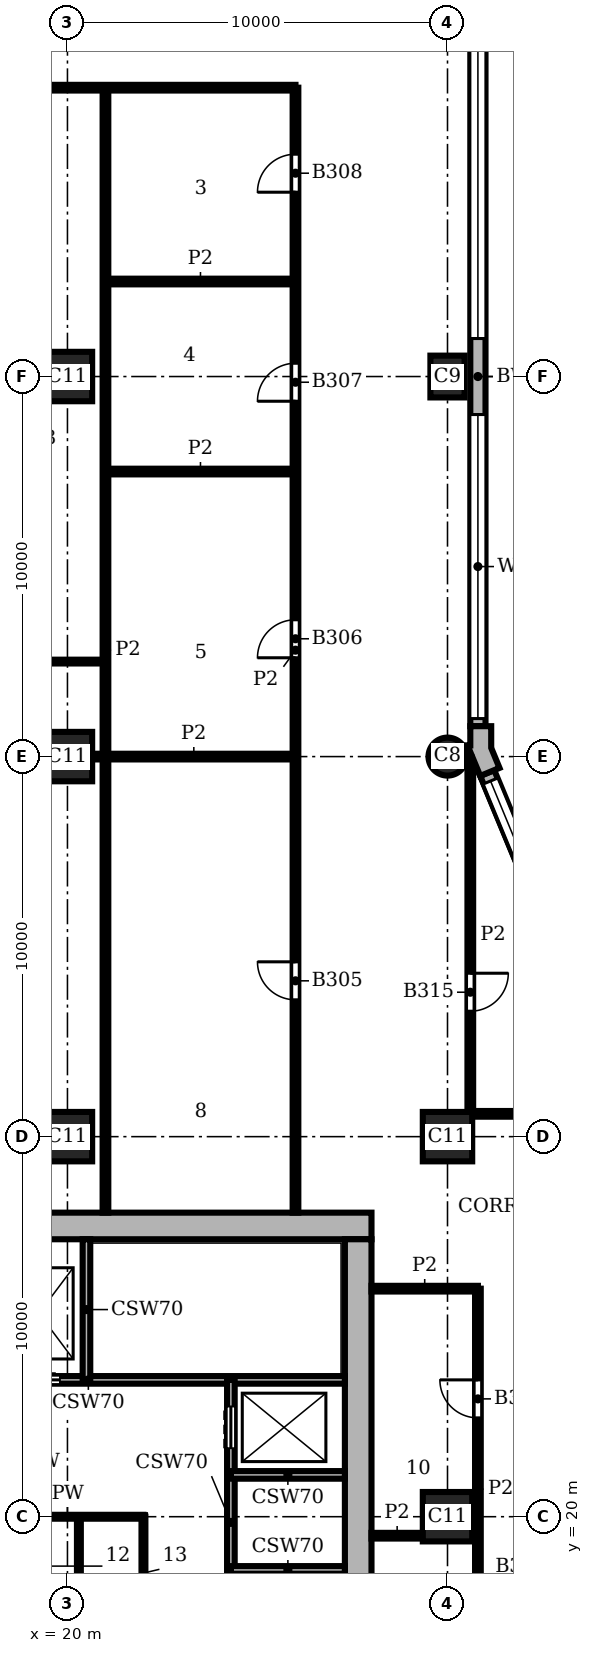
"""IFC4 building model, lengths in metres.
Left out: names, types, materials, properties, quantities, classifications, styles, units other than length and angle.
Written with IfcOpenShell. Run it as: python <this file> out.ifc"""

import sys

from ifc_helpers import new_model, si_unit, direction, frame, frame_2d, origin, origin_2d, place, context, subcontext, project, spatial, polyline, rectangle, circle, outline, extrude, element, fill, save


model = new_model("IFC4")
c1 = context("Model", 3, precision=1e-05, world=origin(), true_north=direction((0.0, 1.0)))
c2 = subcontext(c1, "Body", "Model", "MODEL_VIEW")
j1 = project(units=[si_unit("LENGTHUNIT", "METRE"), si_unit("PLANEANGLEUNIT", "RADIAN")], contexts=[c1])
p1 = place(None, origin())
s1 = spatial("IfcSite", under=j1, at=p1, CompositionType="ELEMENT")
p2 = place(p1, origin())
s2 = spatial("IfcBuilding", under=s1, at=p2, CompositionType="ELEMENT")
p3 = place(p2, frame((0.0, 0.0, 155.1)))
s3 = spatial("IfcBuildingStorey", under=s2, at=p3, CompositionType="ELEMENT", Elevation=155.1)
p4 = place(p3, frame((30.0, 40.0, 0.0), z_axis=(0.0, 0.0, 1.0), x_axis=(1.0, 0.0, 0.0)))
e1 = element("IfcColumn", 1, at=p4, inside=s3, PredefinedType="COLUMN", context=c2, shape_type="SweptSolid", body=[
    extrude(circle(Radius=0.5, at=origin_2d()), origin(), (0.0, 0.0, 1.0), 3.9),
])
p5 = place(p3, frame((30.0, 50.0, 0.0), z_axis=(0.0, 0.0, 1.0), x_axis=(0.0, 1.0, 0.0)))
e2 = element("IfcColumn", 2, at=p5, inside=s3, PredefinedType="COLUMN", context=c2, shape_type="SweptSolid", body=[
    extrude(rectangle(XDim=1.1, YDim=0.9, at=origin_2d()), origin(), (0.0, 0.0, 1.0), 3.9),
])
for number, where, z_axis, x_axis in (
    (3, (20.0, 30.0, 0.0), (0.0, 0.0, 1.0), (1.0, 0.0, 0.0)),
    (4, (20.0, 40.0, 0.0), (0.0, 0.0, 1.0), (1.0, 0.0, 0.0)),
    (5, (20.0, 50.0, 0.0), (0.0, 0.0, 1.0), (1.0, 0.0, 0.0)),
    (6, (30.0, 20.0, 0.0), (0.0, 0.0, 1.0), (1.0, 0.0, 0.0)),
    (7, (30.0, 30.0, 0.0), (0.0, 0.0, 1.0), (1.0, 0.0, 0.0)),
):
    element("IfcColumn", number, at=place(p3, frame(where, z_axis=z_axis, x_axis=x_axis)), inside=s3, PredefinedType="COLUMN", context=c2, shape_type="SweptSolid", body=[
        extrude(rectangle(XDim=1.3, YDim=1.3, at=origin_2d()), origin(), (0.0, 0.0, 1.0), 3.9),
    ])
p6 = place(p3, frame((27.65, 8.7, 0.0), z_axis=(0.0, 0.0, 1.0), x_axis=(0.0, 1.0, 0.0)))
e8 = element("IfcWall", 8, at=p6, inside=s3, PredefinedType="SHEAR", context=c2, shape_type="SweptSolid", body=[
    extrude(rectangle(XDim=18.6, YDim=0.7, at=frame_2d((9.3, 0.0))), origin(), (0.0, 0.0, 1.0), 3.9),
])
p7 = place(p6, frame((4.75, 0.0, 0.0)))
e9 = element("IfcOpeningElement", 9, at=p7, cuts=e8, PredefinedType="OPENING", context=c2, shape_type="SweptSolid", body=[
    extrude(rectangle(XDim=1.6, YDim=2.1, at=frame_2d((0.8, 1.05))), frame((0.0, 0.36, 0.0), z_axis=(0.0, -1.0, 0.0), x_axis=(1.0, 0.0, 0.0)), (0.0, 0.0, 1.0), 0.72),
])
p8 = place(p3, frame((28.0, 27.65, 0.0), z_axis=(0.0, 0.0, 1.0), x_axis=(-1.0, 0.0, 0.0)))
e10 = element("IfcWall", 10, at=p8, inside=s3, PredefinedType="SHEAR", context=c2, shape_type="SweptSolid", body=[
    extrude(rectangle(XDim=20.0, YDim=0.7, at=frame_2d((10.0, 0.0))), origin(), (0.0, 0.0, 1.0), 3.9),
])
p9 = place(p3, origin())
e11 = element("IfcWall", 11, at=p9, inside=s3, PredefinedType="SOLIDWALL", context=c2, shape_type="SweptSolid", body=[
    extrude(outline(polyline([(30.62, 39.995), (30.62, 40.071), (30.861, 39.49), (31.23, 39.644), (31.369, 39.701), (31.15, 40.229), (31.15, 40.8), (31.0, 40.8), (30.6, 40.8), (30.6, 40.295), (30.5, 40.295), (30.5, 39.995), (30.62, 39.995)])), origin(), (0.0, 0.0, 1.0), 3.9),
])
p10 = place(p3, frame((33.362, 33.974, 0.0), z_axis=(0.0, 0.0, 1.0), x_axis=(-0.382655745237, 0.923891000409, 0.0)))
e12 = element("IfcWall", 12, at=p10, inside=s3, PredefinedType="SOLIDWALL", context=c2, shape_type="SweptSolid", body=[
    extrude(rectangle(XDim=6.053, YDim=0.4, at=frame_2d((3.027, 0.0))), origin(), (0.0, 0.0, 1.0), 3.9),
])
p11 = place(p10, frame((0.227, 0.0, 0.9)))
e13 = element("IfcOpeningElement", 13, at=p11, cuts=e12, PredefinedType="OPENING", context=c2, shape_type="SweptSolid", body=[
    extrude(rectangle(XDim=5.6, YDim=2.35, at=frame_2d((2.8, 1.175))), frame((0.0, 0.21, 0.0), z_axis=(0.0, -1.0, 0.0), x_axis=(1.0, 0.0, 0.0)), (0.0, 0.0, 1.0), 0.42),
])
p12 = place(p3, frame((30.8, 40.8, 0.0), z_axis=(0.0, 0.0, 1.0), x_axis=(0.0, 1.0, 0.0)))
e14 = element("IfcWall", 14, at=p12, inside=s3, PredefinedType="SOLIDWALL", context=c2, shape_type="SweptSolid", body=[
    extrude(rectangle(XDim=18.4, YDim=0.4, at=frame_2d((9.2, 0.0))), origin(), (0.0, 0.0, 1.0), 3.9),
])
p13 = place(p12, frame((0.2, 0.0, 0.9)))
e15 = element("IfcOpeningElement", 15, at=p13, cuts=e14, PredefinedType="OPENING", context=c2, shape_type="SweptSolid", body=[
    extrude(rectangle(XDim=8.0, YDim=2.35, at=frame_2d((4.0, 1.175))), frame((0.0, 0.21, 0.0), z_axis=(0.0, -1.0, 0.0), x_axis=(1.0, 0.0, 0.0)), (0.0, 0.0, 1.0), 0.42),
])
p14 = place(p12, frame((10.2, 0.0, 0.9)))
e16 = element("IfcOpeningElement", 16, at=p14, cuts=e14, PredefinedType="OPENING", context=c2, shape_type="SweptSolid", body=[
    extrude(rectangle(XDim=8.0, YDim=2.35, at=frame_2d((4.0, 1.175))), frame((0.0, 0.21, 0.0), z_axis=(0.0, -1.0, 0.0), x_axis=(1.0, 0.0, 0.0)), (0.0, 0.0, 1.0), 0.42),
])
p15 = place(p3, frame((24.3, 18.6, 0.0), z_axis=(0.0, 0.0, 1.0), x_axis=(1.0, 0.0, 0.0)))
e17 = element("IfcWall", 17, at=p15, inside=s3, PredefinedType="SHEAR", context=c2, shape_type="SweptSolid", body=[
    extrude(rectangle(XDim=3.0, YDim=0.2, at=frame_2d((1.5, 0.0))), origin(), (0.0, 0.0, 1.0), 3.58),
])
p16 = place(p3, frame((18.0, 20.0, 0.0), z_axis=(0.0, 0.0, 1.0), x_axis=(1.0, 0.0, 0.0)))
e18 = element("IfcWall", 18, at=p16, inside=s3, PredefinedType="PARTITIONING", context=c2, shape_type="SweptSolid", body=[
    extrude(rectangle(XDim=4.0, YDim=0.1, at=frame_2d((2.0, 0.0))), origin(), (0.0, 0.0, 1.0), 3.58),
])
p17 = place(p3, frame((24.3, 21.1, 0.0), z_axis=(0.0, 0.0, 1.0), x_axis=(1.0, 0.0, 0.0)))
e19 = element("IfcWall", 19, at=p17, inside=s3, PredefinedType="SHEAR", context=c2, shape_type="SweptSolid", body=[
    extrude(rectangle(XDim=3.0, YDim=0.2, at=frame_2d((1.5, 0.0))), origin(), (0.0, 0.0, 1.0), 3.58),
])
p18 = place(p3, frame((13.8, 23.6, 0.0), z_axis=(0.0, 0.0, 1.0), x_axis=(1.0, 0.0, 0.0)))
e20 = element("IfcWall", 20, at=p18, inside=s3, PredefinedType="SHEAR", context=c2, shape_type="SweptSolid", body=[
    extrude(rectangle(XDim=13.5, YDim=0.2, at=frame_2d((6.75, 0.0))), origin(), (0.0, 0.0, 1.0), 3.58),
])
p19 = place(p18, frame((2.4, 0.0, 0.0)))
e21 = element("IfcOpeningElement", 21, at=p19, cuts=e20, PredefinedType="OPENING", context=c2, shape_type="SweptSolid", body=[
    extrude(rectangle(XDim=1.1, YDim=2.1, at=frame_2d((0.55, 1.05))), frame((0.0, 0.11, 0.0), z_axis=(0.0, -1.0, 0.0), x_axis=(1.0, 0.0, 0.0)), (0.0, 0.0, 1.0), 0.22),
])
p20 = place(p18, frame((4.9, 0.0, 0.0)))
e22 = element("IfcOpeningElement", 22, at=p20, cuts=e20, PredefinedType="OPENING", context=c2, shape_type="SweptSolid", body=[
    extrude(rectangle(XDim=1.1, YDim=2.1, at=frame_2d((0.55, 1.05))), frame((0.0, 0.11, 0.0), z_axis=(0.0, -1.0, 0.0), x_axis=(1.0, 0.0, 0.0)), (0.0, 0.0, 1.0), 0.22),
])
p21 = place(p18, frame((0.2, 0.0, 0.0)))
e23 = element("IfcOpeningElement", 23, at=p21, cuts=e20, PredefinedType="OPENING", context=c2, shape_type="SweptSolid", body=[
    extrude(rectangle(XDim=1.0, YDim=2.1, at=frame_2d((0.5, 1.05))), frame((0.0, 0.11, 0.0), z_axis=(0.0, -1.0, 0.0), x_axis=(1.0, 0.0, 0.0)), (0.0, 0.0, 1.0), 0.22),
])
p22 = place(p3, frame((20.3, 17.5, 0.0), z_axis=(0.0, 0.0, 1.0), x_axis=(0.0, 1.0, 0.0)))
e24 = element("IfcWall", 24, at=p22, inside=s3, PredefinedType="PARTITIONING", context=c2, shape_type="SweptSolid", body=[
    extrude(rectangle(XDim=2.5, YDim=0.1, at=frame_2d((1.25, 0.0))), origin(), (0.0, 0.0, 1.0), 3.58),
])
p23 = place(p3, frame((20.5, 23.6, 0.0), z_axis=(0.0, 0.0, 1.0), x_axis=(0.0, 1.0, 0.0)))
e25 = element("IfcWall", 25, at=p23, inside=s3, PredefinedType="SHEAR", context=c2, shape_type="SweptSolid", body=[
    extrude(rectangle(XDim=3.7, YDim=0.2, at=frame_2d((1.85, 0.0))), origin(), (0.0, 0.0, 1.0), 3.58),
])
p24 = place(p3, frame((22.0, 16.2, 0.0), z_axis=(0.0, 0.0, 1.0), x_axis=(0.0, 1.0, 0.0)))
e26 = element("IfcWall", 26, at=p24, inside=s3, PredefinedType="PARTITIONING", context=c2, shape_type="SweptSolid", body=[
    extrude(rectangle(XDim=3.8, YDim=0.1, at=frame_2d((1.9, 0.0))), origin(), (0.0, 0.0, 1.0), 3.58),
])
p25 = place(p24, frame((0.1, 0.0, 0.0)))
e27 = element("IfcOpeningElement", 27, at=p25, cuts=e26, PredefinedType="OPENING", context=c2, shape_type="SweptSolid", body=[
    extrude(rectangle(XDim=1.1, YDim=2.1, at=frame_2d((0.55, 1.05))), frame((0.0, 0.06, 0.0), z_axis=(0.0, -1.0, 0.0), x_axis=(1.0, 0.0, 0.0)), (0.0, 0.0, 1.0), 0.12),
])
p26 = place(p3, frame((24.3, 16.1, 0.0), z_axis=(0.0, 0.0, 1.0), x_axis=(0.0, 1.0, 0.0)))
e28 = element("IfcWall", 28, at=p26, inside=s3, PredefinedType="SHEAR", context=c2, shape_type="SweptSolid", body=[
    extrude(rectangle(XDim=7.5, YDim=0.2, at=frame_2d((3.75, 0.0))), origin(), (0.0, 0.0, 1.0), 3.58),
])
p27 = place(p26, frame((5.7, 0.0, 0.0)))
e29 = element("IfcOpeningElement", 29, at=p27, cuts=e28, PredefinedType="OPENING", context=c2, shape_type="SweptSolid", body=[
    extrude(rectangle(XDim=1.1, YDim=2.1, at=frame_2d((0.55, 1.05))), frame((0.0, 0.11, 0.0), z_axis=(0.0, -1.0, 0.0), x_axis=(1.0, 0.0, 0.0)), (0.0, 0.0, 1.0), 0.22),
])
p28 = place(p3, frame((9.0, 42.5, 0.0), z_axis=(0.0, 0.0, 1.0), x_axis=(1.0, 0.0, 0.0)))
e30 = element("IfcWall", 30, at=p28, inside=s3, PredefinedType="PARTITIONING", context=c2, shape_type="SweptSolid", body=[
    extrude(rectangle(XDim=12.0, YDim=0.1, at=frame_2d((6.0, 0.0))), origin(), (0.0, 0.0, 1.0), 3.58),
])
p29 = place(p28, frame((6.35, 0.0, 0.0)))
e31 = element("IfcOpeningElement", 31, at=p29, cuts=e30, PredefinedType="OPENING", context=c2, shape_type="SweptSolid", body=[
    extrude(rectangle(XDim=0.9, YDim=2.1, at=frame_2d((0.45, 1.05))), frame((0.0, 0.06, 0.0), z_axis=(0.0, -1.0, 0.0), x_axis=(1.0, 0.0, 0.0)), (0.0, 0.0, 1.0), 0.12),
])
p30 = place(p3, frame((21.0, 28.0, 0.0), z_axis=(0.0, 0.0, 1.0), x_axis=(0.0, 1.0, 0.0)))
e32 = element("IfcWall", 32, at=p30, inside=s3, PredefinedType="PARTITIONING", context=c2, shape_type="SweptSolid", body=[
    extrude(rectangle(XDim=29.6, YDim=0.15, at=frame_2d((14.8, 0.0))), origin(), (0.0, 0.0, 1.0), 3.58),
])
p31 = place(p3, frame((26.0, 28.0, 0.0), z_axis=(0.0, 0.0, 1.0), x_axis=(0.0, 1.0, 0.0)))
e33 = element("IfcWall", 33, at=p31, inside=s3, PredefinedType="PARTITIONING", context=c2, shape_type="SweptSolid", body=[
    extrude(rectangle(XDim=29.6, YDim=0.15, at=frame_2d((14.8, 0.0))), origin(), (0.0, 0.0, 1.0), 3.58),
])
p32 = place(p31, frame((5.6, 0.0, 0.0)))
e34 = element("IfcOpeningElement", 34, at=p32, cuts=e33, PredefinedType="OPENING", context=c2, shape_type="SweptSolid", body=[
    extrude(rectangle(XDim=1.0, YDim=2.1, at=frame_2d((0.5, 1.05))), frame((0.0, 0.085, 0.0), z_axis=(0.0, -1.0, 0.0), x_axis=(1.0, 0.0, 0.0)), (0.0, 0.0, 1.0), 0.17),
])
p33 = place(p31, frame((14.6, 0.0, 0.0)))
e35 = element("IfcOpeningElement", 35, at=p33, cuts=e33, PredefinedType="OPENING", context=c2, shape_type="SweptSolid", body=[
    extrude(rectangle(XDim=1.0, YDim=2.1, at=frame_2d((0.5, 1.05))), frame((0.0, 0.085, 0.0), z_axis=(0.0, -1.0, 0.0), x_axis=(1.0, 0.0, 0.0)), (0.0, 0.0, 1.0), 0.17),
])
p34 = place(p31, frame((21.35, 0.0, 0.0)))
e36 = element("IfcOpeningElement", 36, at=p34, cuts=e33, PredefinedType="OPENING", context=c2, shape_type="SweptSolid", body=[
    extrude(rectangle(XDim=1.0, YDim=2.1, at=frame_2d((0.5, 1.05))), frame((0.0, 0.085, 0.0), z_axis=(0.0, -1.0, 0.0), x_axis=(1.0, 0.0, 0.0)), (0.0, 0.0, 1.0), 0.17),
])
p35 = place(p31, frame((26.85, 0.0, 0.0)))
e37 = element("IfcOpeningElement", 37, at=p35, cuts=e33, PredefinedType="OPENING", context=c2, shape_type="SweptSolid", body=[
    extrude(rectangle(XDim=1.0, YDim=2.1, at=frame_2d((0.5, 1.05))), frame((0.0, 0.085, 0.0), z_axis=(0.0, -1.0, 0.0), x_axis=(1.0, 0.0, 0.0)), (0.0, 0.0, 1.0), 0.17),
])
p36 = place(p3, frame((30.6, 30.65, 0.0), z_axis=(0.0, 0.0, 1.0), x_axis=(0.0, 1.0, 0.0)))
e38 = element("IfcWall", 38, at=p36, inside=s3, PredefinedType="PARTITIONING", context=c2, shape_type="SweptSolid", body=[
    extrude(rectangle(XDim=9.288, YDim=0.15, at=frame_2d((4.644, 0.0))), origin(), (0.0, 0.0, 1.0), 3.58),
])
p37 = place(p36, frame((2.65, 0.0, 0.0)))
e39 = element("IfcOpeningElement", 39, at=p37, cuts=e38, PredefinedType="OPENING", context=c2, shape_type="SweptSolid", body=[
    extrude(rectangle(XDim=1.0, YDim=2.1, at=frame_2d((0.5, 1.05))), frame((0.0, 0.085, 0.0), z_axis=(0.0, -1.0, 0.0), x_axis=(1.0, 0.0, 0.0)), (0.0, 0.0, 1.0), 0.17),
])
p38 = place(p3, frame((30.8, 15.45, 0.0), z_axis=(0.0, 0.0, 1.0), x_axis=(0.0, 1.0, 0.0)))
e40 = element("IfcWall", 40, at=p38, inside=s3, PredefinedType="PARTITIONING", context=c2, shape_type="SweptSolid", body=[
    extrude(rectangle(XDim=10.55, YDim=0.15, at=frame_2d((5.275, 0.0))), origin(), (0.0, 0.0, 1.0), 3.58),
])
p39 = place(p38, frame((7.15, 0.0, 0.0)))
e41 = element("IfcOpeningElement", 41, at=p39, cuts=e40, PredefinedType="OPENING", context=c2, shape_type="SweptSolid", body=[
    extrude(rectangle(XDim=1.0, YDim=2.1, at=frame_2d((0.5, 1.05))), frame((0.0, 0.085, 0.0), z_axis=(0.0, -1.0, 0.0), x_axis=(1.0, 0.0, 0.0)), (0.0, 0.0, 1.0), 0.17),
])
p40 = place(p38, frame((1.6, 0.0, 0.0)))
e42 = element("IfcOpeningElement", 42, at=p40, cuts=e40, PredefinedType="OPENING", context=c2, shape_type="SweptSolid", body=[
    extrude(rectangle(XDim=1.0, YDim=2.1, at=frame_2d((0.5, 1.05))), frame((0.0, 0.085, 0.0), z_axis=(0.0, -1.0, 0.0), x_axis=(1.0, 0.0, 0.0)), (0.0, 0.0, 1.0), 0.17),
])
p41 = place(p3, frame((28.0, 19.5, 0.0), z_axis=(0.0, 0.0, 1.0), x_axis=(1.0, 0.0, 0.0)))
e43 = element("IfcWall", 43, at=p41, inside=s3, PredefinedType="PARTITIONING", context=c2, shape_type="SweptSolid", body=[
    extrude(rectangle(XDim=1.35, YDim=0.15, at=frame_2d((0.675, 0.0))), origin(), (0.0, 0.0, 1.0), 3.58),
])
p42 = place(p3, frame((28.0, 26.0, 0.0), z_axis=(0.0, 0.0, 1.0), x_axis=(1.0, 0.0, 0.0)))
e44 = element("IfcWall", 44, at=p42, inside=s3, PredefinedType="PARTITIONING", context=c2, shape_type="SweptSolid", body=[
    extrude(rectangle(XDim=2.8, YDim=0.15, at=frame_2d((1.4, 0.0))), origin(), (0.0, 0.0, 1.0), 3.58),
])
p43 = place(p3, frame((30.65, 30.6, 0.0), z_axis=(0.0, 0.0, 1.0), x_axis=(1.0, 0.0, 0.0)))
e45 = element("IfcWall", 45, at=p43, inside=s3, PredefinedType="PARTITIONING", context=c2, shape_type="SweptSolid", body=[
    extrude(rectangle(XDim=9.288, YDim=0.15, at=frame_2d((4.644, 0.0))), origin(), (0.0, 0.0, 1.0), 3.58),
])
p44 = place(p3, frame((20.65, 40.0, 0.0), z_axis=(0.0, 0.0, 1.0), x_axis=(1.0, 0.0, 0.0)))
e46 = element("IfcWall", 46, at=p44, inside=s3, PredefinedType="PARTITIONING", context=c2, shape_type="SweptSolid", body=[
    extrude(rectangle(XDim=5.35, YDim=0.15, at=frame_2d((2.675, 0.0))), origin(), (0.0, 0.0, 1.0), 3.58),
])
for number, where, z_axis, x_axis in (
    (47, (21.0, 47.5, 0.0), (0.0, 0.0, 1.0), (1.0, 0.0, 0.0)),
    (48, (21.0, 52.5, 0.0), (0.0, 0.0, 1.0), (1.0, 0.0, 0.0)),
):
    element("IfcWall", number, at=place(p3, frame(where, z_axis=z_axis, x_axis=x_axis)), inside=s3, PredefinedType="PARTITIONING", context=c2, shape_type="SweptSolid", body=[
        extrude(rectangle(XDim=5.0, YDim=0.15, at=frame_2d((2.5, 0.0))), origin(), (0.0, 0.0, 1.0), 3.58),
    ])
p45 = place(p3, frame((12.0, 57.6, 0.0), z_axis=(0.0, 0.0, 1.0), x_axis=(1.0, 0.0, 0.0)))
e49 = element("IfcWall", 49, at=p45, inside=s3, PredefinedType="PARTITIONING", context=c2, shape_type="SweptSolid", body=[
    extrude(rectangle(XDim=14.0, YDim=0.15, at=frame_2d((7.0, 0.0))), origin(), (0.0, 0.0, 1.0), 3.58),
])
p46 = place(p45, frame((3.1, 0.0, 0.0)))
e50 = element("IfcOpeningElement", 50, at=p46, cuts=e49, PredefinedType="OPENING", context=c2, shape_type="SweptSolid", body=[
    extrude(rectangle(XDim=1.8, YDim=2.1, at=frame_2d((0.9, 1.05))), frame((0.0, 0.085, 0.0), z_axis=(0.0, -1.0, 0.0), x_axis=(1.0, 0.0, 0.0)), (0.0, 0.0, 1.0), 0.17),
])
p47 = place(p11, origin())
e51 = element("IfcWindow", 51, at=p47, inside=s3, PartitioningType="SINGLE_PANEL", PredefinedType="WINDOW", context=c2, shape_type="SweptSolid", body=[
    extrude(rectangle(XDim=5.6, YDim=2.35, at=frame_2d((2.8, 1.175))), frame((0.0, 0.16, 0.0), z_axis=(0.0, -1.0, 0.0), x_axis=(1.0, 0.0, 0.0)), (0.0, 0.0, 1.0), 0.06),
])
fill(e13, e51)
p48 = place(p13, origin())
e52 = element("IfcWindow", 52, at=p48, inside=s3, PartitioningType="SINGLE_PANEL", PredefinedType="WINDOW", context=c2, shape_type="SweptSolid", body=[
    extrude(rectangle(XDim=8.0, YDim=2.35, at=frame_2d((4.0, 1.175))), frame((0.0, 0.16, 0.0), z_axis=(0.0, -1.0, 0.0), x_axis=(1.0, 0.0, 0.0)), (0.0, 0.0, 1.0), 0.06),
])
fill(e15, e52)
p49 = place(p14, origin())
e53 = element("IfcWindow", 53, at=p49, inside=s3, PartitioningType="SINGLE_PANEL", PredefinedType="WINDOW", context=c2, shape_type="SweptSolid", body=[
    extrude(rectangle(XDim=8.0, YDim=2.35, at=frame_2d((4.0, 1.175))), frame((0.0, 0.16, 0.0), z_axis=(0.0, -1.0, 0.0), x_axis=(1.0, 0.0, 0.0)), (0.0, 0.0, 1.0), 0.06),
])
fill(e16, e53)
p50 = place(p27, origin())
e54 = element("IfcDoor", 54, at=p50, inside=s3, OperationType="DOUBLE_DOOR_SLIDING", PredefinedType="DOOR", context=c2, shape_type="SweptSolid", body=[
    extrude(rectangle(XDim=1.1, YDim=2.1, at=frame_2d((0.55, 1.05))), frame((0.0, 0.025, 0.0), z_axis=(0.0, -1.0, 0.0), x_axis=(1.0, 0.0, 0.0)), (0.0, 0.0, 1.0), 0.05),
])
fill(e29, e54)
p51 = place(p20, origin())
e55 = element("IfcDoor", 55, at=p51, inside=s3, OperationType="DOUBLE_DOOR_SLIDING", PredefinedType="DOOR", context=c2, shape_type="SweptSolid", body=[
    extrude(rectangle(XDim=1.1, YDim=2.1, at=frame_2d((0.55, 1.05))), frame((0.0, 0.025, 0.0), z_axis=(0.0, -1.0, 0.0), x_axis=(1.0, 0.0, 0.0)), (0.0, 0.0, 1.0), 0.05),
])
fill(e22, e55)
p52 = place(p32, origin())
e56 = element("IfcDoor", 56, at=p52, inside=s3, OperationType="SINGLE_SWING_RIGHT", PredefinedType="DOOR", context=c2, shape_type="SweptSolid", body=[
    extrude(rectangle(XDim=1.0, YDim=2.1, at=frame_2d((0.5, 1.05))), frame((0.0, 0.025, 0.0), z_axis=(0.0, -1.0, 0.0), x_axis=(1.0, 0.0, 0.0)), (0.0, 0.0, 1.0), 0.05),
])
fill(e34, e56)
p53 = place(p33, origin())
e57 = element("IfcDoor", 57, at=p53, inside=s3, OperationType="SINGLE_SWING_LEFT", PredefinedType="DOOR", context=c2, shape_type="SweptSolid", body=[
    extrude(rectangle(XDim=1.0, YDim=2.1, at=frame_2d((0.5, 1.05))), frame((0.0, 0.025, 0.0), z_axis=(0.0, -1.0, 0.0), x_axis=(1.0, 0.0, 0.0)), (0.0, 0.0, 1.0), 0.05),
])
fill(e35, e57)
p54 = place(p34, origin())
e58 = element("IfcDoor", 58, at=p54, inside=s3, OperationType="SINGLE_SWING_LEFT", PredefinedType="DOOR", context=c2, shape_type="SweptSolid", body=[
    extrude(rectangle(XDim=1.0, YDim=2.1, at=frame_2d((0.5, 1.05))), frame((0.0, 0.025, 0.0), z_axis=(0.0, -1.0, 0.0), x_axis=(1.0, 0.0, 0.0)), (0.0, 0.0, 1.0), 0.05),
])
fill(e36, e58)
p55 = place(p35, origin())
e59 = element("IfcDoor", 59, at=p55, inside=s3, OperationType="SINGLE_SWING_LEFT", PredefinedType="DOOR", context=c2, shape_type="SweptSolid", body=[
    extrude(rectangle(XDim=1.0, YDim=2.1, at=frame_2d((0.5, 1.05))), frame((0.0, 0.025, 0.0), z_axis=(0.0, -1.0, 0.0), x_axis=(1.0, 0.0, 0.0)), (0.0, 0.0, 1.0), 0.05),
])
fill(e37, e59)
p56 = place(p39, origin())
e60 = element("IfcDoor", 60, at=p56, inside=s3, OperationType="SINGLE_SWING_RIGHT", PredefinedType="DOOR", context=c2, shape_type="SweptSolid", body=[
    extrude(rectangle(XDim=1.0, YDim=2.1, at=frame_2d((0.5, 1.05))), frame((0.0, 0.025, 0.0), z_axis=(0.0, -1.0, 0.0), x_axis=(1.0, 0.0, 0.0)), (0.0, 0.0, 1.0), 0.05),
])
fill(e41, e60)
p57 = place(p37, frame((1.0, 0.0, 0.0), z_axis=(0.0, 0.0, 1.0), x_axis=(-1.0, 0.0, 0.0)))
e61 = element("IfcDoor", 61, at=p57, inside=s3, OperationType="SINGLE_SWING_LEFT", PredefinedType="DOOR", context=c2, shape_type="SweptSolid", body=[
    extrude(rectangle(XDim=1.0, YDim=2.1, at=frame_2d((0.5, 1.05))), frame((0.0, 0.025, 0.0), z_axis=(0.0, -1.0, 0.0), x_axis=(1.0, 0.0, 0.0)), (0.0, 0.0, 1.0), 0.05),
])
fill(e39, e61)
save(model, sys.argv[1])
